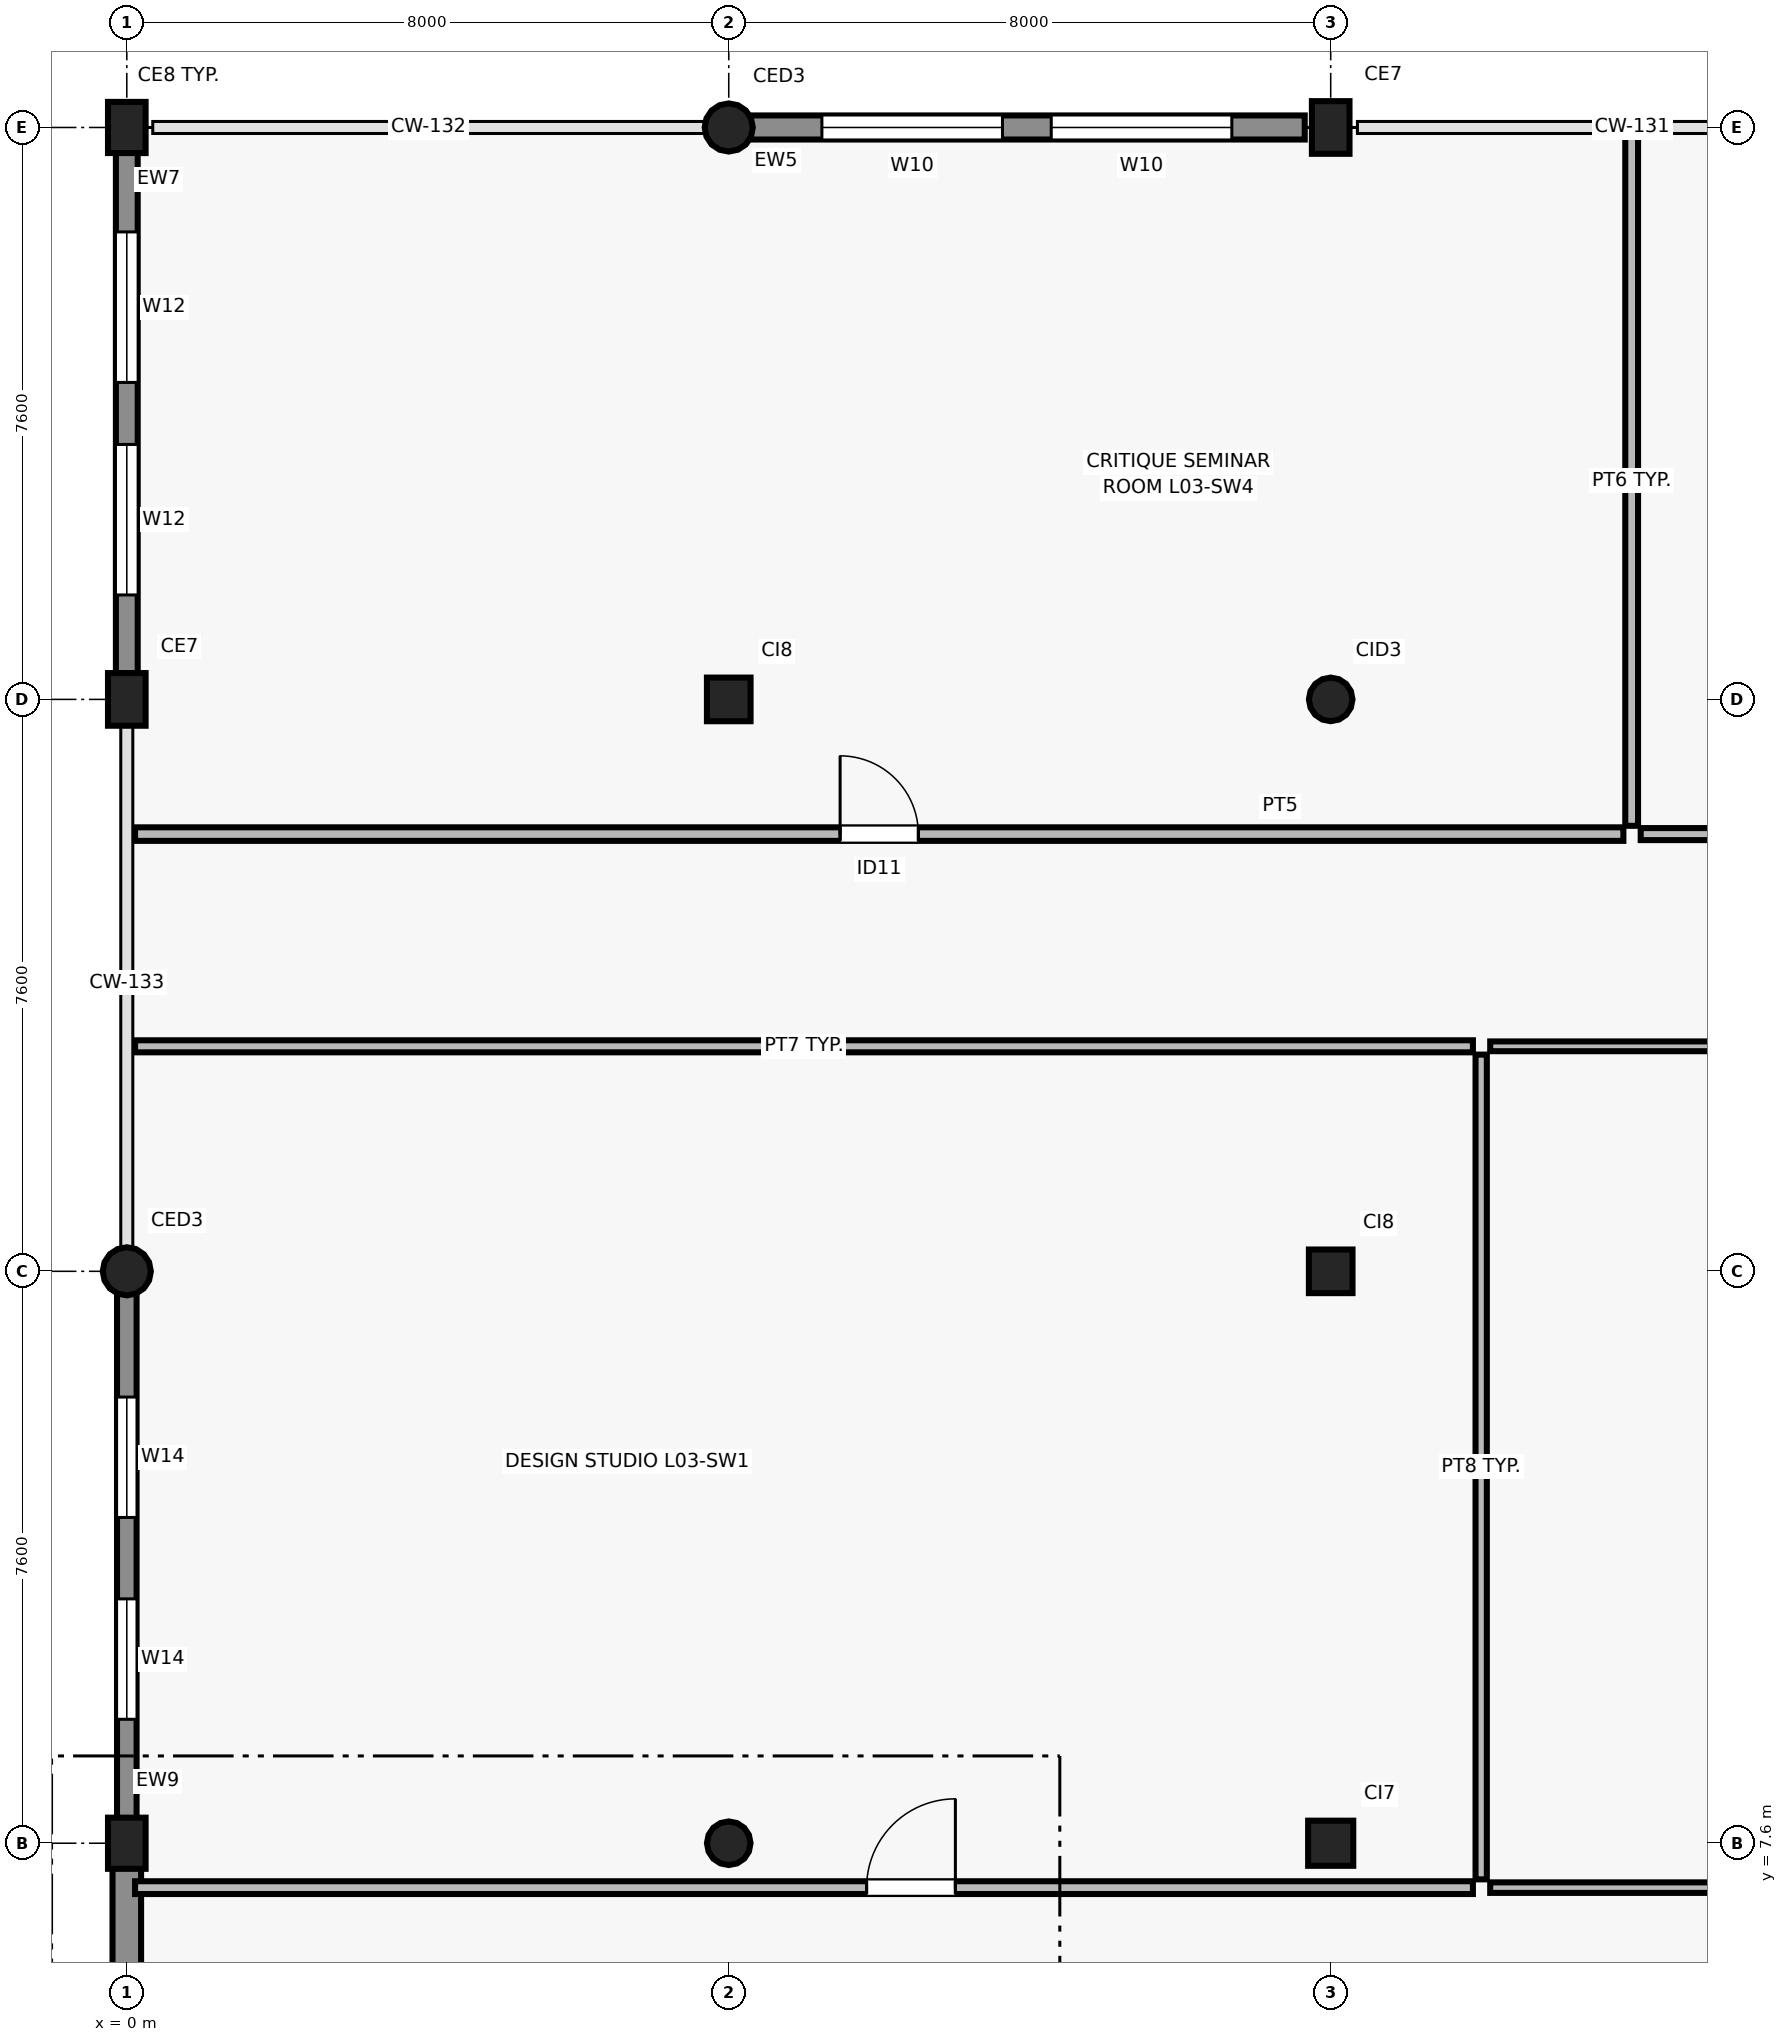
"""IFC4 building model, lengths in metres.
Left out: names, types, materials, properties, quantities, classifications, styles, units other than length and angle.
Written with IfcOpenShell. Run it as: python <this file> out.ifc"""

import sys

from ifc_helpers import new_model, si_unit, direction, frame, frame_2d, origin, origin_2d, place, context, subcontext, project, spatial, rectangle, circle, extrude, element, fill, save


model = new_model("IFC4")
c1 = context("Model", 3, precision=1e-05, world=origin(), true_north=direction((0.0, 1.0)))
c2 = subcontext(c1, "Body", "Model", "MODEL_VIEW")
j1 = project(units=[si_unit("LENGTHUNIT", "METRE"), si_unit("PLANEANGLEUNIT", "RADIAN")], contexts=[c1])
p1 = place(None, origin())
s1 = spatial("IfcSite", under=j1, at=p1, CompositionType="ELEMENT")
p2 = place(p1, origin())
s2 = spatial("IfcBuilding", under=s1, at=p2, CompositionType="ELEMENT")
p3 = place(p2, frame((0.0, 0.0, 13.2)))
s3 = spatial("IfcBuildingStorey", under=s2, at=p3, CompositionType="ELEMENT", Elevation=13.2)
p4 = place(p3, frame((0.0, 7.6, 0.0), z_axis=(0.0, 0.0, 1.0), x_axis=(1.0, 0.0, 0.0)))
e1 = element("IfcColumn", 1, at=p4, inside=s3, PredefinedType="COLUMN", context=c2, shape_type="SweptSolid", body=[
    extrude(rectangle(XDim=0.68, YDim=0.5, at=origin_2d()), origin(), (0.0, 0.0, 1.0), 4.2),
])
p5 = place(p3, frame((0.0, 15.2, 0.0), z_axis=(0.0, 0.0, 1.0), x_axis=(1.0, 0.0, 0.0)))
e2 = element("IfcColumn", 2, at=p5, inside=s3, PredefinedType="COLUMN", context=c2, shape_type="SweptSolid", body=[
    extrude(circle(Radius=0.32, at=origin_2d()), origin(), (0.0, 0.0, 1.0), 4.2),
])
p6 = place(p3, frame((0.0, 22.8, 0.0), z_axis=(0.0, 0.0, 1.0), x_axis=(1.0, 0.0, 0.0)))
e3 = element("IfcColumn", 3, at=p6, inside=s3, PredefinedType="COLUMN", context=c2, shape_type="SweptSolid", body=[
    extrude(rectangle(XDim=0.7, YDim=0.5, at=origin_2d()), origin(), (0.0, 0.0, 1.0), 4.2),
])
p7 = place(p3, frame((0.0, 30.4, 0.0), z_axis=(0.0, 0.0, 1.0), x_axis=(1.0, 0.0, 0.0)))
e4 = element("IfcColumn", 4, at=p7, inside=s3, PredefinedType="COLUMN", context=c2, shape_type="SweptSolid", body=[
    extrude(rectangle(XDim=0.68, YDim=0.5, at=origin_2d()), origin(), (0.0, 0.0, 1.0), 4.2),
])
p8 = place(p3, frame((8.0, 7.6, 0.0), z_axis=(0.0, 0.0, 1.0), x_axis=(1.0, 0.0, 0.0)))
e5 = element("IfcColumn", 5, at=p8, inside=s3, PredefinedType="COLUMN", context=c2, shape_type="SweptSolid", body=[
    extrude(circle(Radius=0.29, at=origin_2d()), origin(), (0.0, 0.0, 1.0), 4.2),
])
p9 = place(p3, frame((8.0, 22.8, 0.0), z_axis=(0.0, 0.0, 1.0), x_axis=(1.0, 0.0, 0.0)))
e6 = element("IfcColumn", 6, at=p9, inside=s3, PredefinedType="COLUMN", context=c2, shape_type="SweptSolid", body=[
    extrude(rectangle(XDim=0.58, YDim=0.58, at=origin_2d()), origin(), (0.0, 0.0, 1.0), 4.2),
])
p10 = place(p3, frame((8.0, 30.4, 0.0), z_axis=(0.0, 0.0, 1.0), x_axis=(1.0, 0.0, 0.0)))
e7 = element("IfcColumn", 7, at=p10, inside=s3, PredefinedType="COLUMN", context=c2, shape_type="SweptSolid", body=[
    extrude(circle(Radius=0.32, at=origin_2d()), origin(), (0.0, 0.0, 1.0), 4.2),
])
p11 = place(p3, frame((16.0, 7.6, 0.0), z_axis=(0.0, 0.0, 1.0), x_axis=(1.0, 0.0, 0.0)))
e8 = element("IfcColumn", 8, at=p11, inside=s3, PredefinedType="COLUMN", context=c2, shape_type="SweptSolid", body=[
    extrude(rectangle(XDim=0.6, YDim=0.6, at=origin_2d()), origin(), (0.0, 0.0, 1.0), 4.2),
])
p12 = place(p3, frame((16.0, 15.2, 0.0), z_axis=(0.0, 0.0, 1.0), x_axis=(1.0, 0.0, 0.0)))
e9 = element("IfcColumn", 9, at=p12, inside=s3, PredefinedType="COLUMN", context=c2, shape_type="SweptSolid", body=[
    extrude(rectangle(XDim=0.58, YDim=0.58, at=origin_2d()), origin(), (0.0, 0.0, 1.0), 4.2),
])
p13 = place(p3, frame((16.0, 22.8, 0.0), z_axis=(0.0, 0.0, 1.0), x_axis=(1.0, 0.0, 0.0)))
e10 = element("IfcColumn", 10, at=p13, inside=s3, PredefinedType="COLUMN", context=c2, shape_type="SweptSolid", body=[
    extrude(circle(Radius=0.29, at=origin_2d()), origin(), (0.0, 0.0, 1.0), 4.2),
])
p14 = place(p3, frame((16.0, 30.4, 0.0), z_axis=(0.0, 0.0, 1.0), x_axis=(1.0, 0.0, 0.0)))
e11 = element("IfcColumn", 11, at=p14, inside=s3, PredefinedType="COLUMN", context=c2, shape_type="SweptSolid", body=[
    extrude(rectangle(XDim=0.7, YDim=0.5, at=origin_2d()), origin(), (0.0, 0.0, 1.0), 4.2),
])
p15 = place(p3, frame((15.655, 30.4, 0.0), z_axis=(0.0, 0.0, 1.0), x_axis=(-1.0, 0.0, 0.0)))
e12 = element("IfcWall", 12, at=p15, inside=s3, PredefinedType="SOLIDWALL", context=c2, shape_type="SweptSolid", body=[
    extrude(rectangle(XDim=7.386, YDim=0.32, at=frame_2d((3.693, 0.0))), origin(), (0.0, 0.0, 1.0), 3.31),
])
p16 = place(p15, frame((0.969, 0.0, 0.9)))
e13 = element("IfcOpeningElement", 13, at=p16, cuts=e12, PredefinedType="OPENING", context=c2, shape_type="SweptSolid", body=[
    extrude(rectangle(XDim=2.4, YDim=1.5, at=frame_2d((1.2, 0.75))), frame((0.0, 0.17, 0.0), z_axis=(0.0, -1.0, 0.0), x_axis=(1.0, 0.0, 0.0)), (0.0, 0.0, 1.0), 0.34),
])
p17 = place(p15, frame((4.017, 0.0, 0.9)))
e14 = element("IfcOpeningElement", 14, at=p17, cuts=e12, PredefinedType="OPENING", context=c2, shape_type="SweptSolid", body=[
    extrude(rectangle(XDim=2.4, YDim=1.5, at=frame_2d((1.2, 0.75))), frame((0.0, 0.17, 0.0), z_axis=(0.0, -1.0, 0.0), x_axis=(1.0, 0.0, 0.0)), (0.0, 0.0, 1.0), 0.34),
])
p18 = place(p3, frame((0.0, 30.155, 0.0), z_axis=(0.0, 0.0, 1.0), x_axis=(0.0, -1.0, 0.0)))
e15 = element("IfcWall", 15, at=p18, inside=s3, PredefinedType="SOLIDWALL", context=c2, shape_type="SweptSolid", body=[
    extrude(rectangle(XDim=7.11, YDim=0.29, at=frame_2d((3.555, 0.0))), origin(), (0.0, 0.0, 1.0), 3.5),
])
p19 = place(p18, frame((1.143, 0.0, 0.9)))
e16 = element("IfcOpeningElement", 16, at=p19, cuts=e15, PredefinedType="OPENING", context=c2, shape_type="SweptSolid", body=[
    extrude(rectangle(XDim=2.0, YDim=1.5, at=frame_2d((1.0, 0.75))), frame((0.0, 0.155, 0.0), z_axis=(0.0, -1.0, 0.0), x_axis=(1.0, 0.0, 0.0)), (0.0, 0.0, 1.0), 0.31),
])
p20 = place(p18, frame((3.967, 0.0, 0.9)))
e17 = element("IfcOpeningElement", 17, at=p20, cuts=e15, PredefinedType="OPENING", context=c2, shape_type="SweptSolid", body=[
    extrude(rectangle(XDim=2.0, YDim=1.5, at=frame_2d((1.0, 0.75))), frame((0.0, 0.155, 0.0), z_axis=(0.0, -1.0, 0.0), x_axis=(1.0, 0.0, 0.0)), (0.0, 0.0, 1.0), 0.31),
])
p21 = place(p3, frame((0.0, 14.931, 0.0), z_axis=(0.0, 0.0, 1.0), x_axis=(0.0, -1.0, 0.0)))
e18 = element("IfcWall", 18, at=p21, inside=s3, PredefinedType="SOLIDWALL", context=c2, shape_type="SweptSolid", body=[
    extrude(rectangle(XDim=7.086, YDim=0.26, at=frame_2d((3.543, 0.0))), origin(), (0.0, 0.0, 1.0), 3.38),
])
p22 = place(p21, frame((1.402, 0.0, 0.9)))
e19 = element("IfcOpeningElement", 19, at=p22, cuts=e18, PredefinedType="OPENING", context=c2, shape_type="SweptSolid", body=[
    extrude(rectangle(XDim=1.6, YDim=1.5, at=frame_2d((0.8, 0.75))), frame((0.0, 0.14, 0.0), z_axis=(0.0, -1.0, 0.0), x_axis=(1.0, 0.0, 0.0)), (0.0, 0.0, 1.0), 0.28),
])
p23 = place(p21, frame((4.084, 0.0, 0.9)))
e20 = element("IfcOpeningElement", 20, at=p23, cuts=e18, PredefinedType="OPENING", context=c2, shape_type="SweptSolid", body=[
    extrude(rectangle(XDim=1.6, YDim=1.5, at=frame_2d((0.8, 0.75))), frame((0.0, 0.14, 0.0), z_axis=(0.0, -1.0, 0.0), x_axis=(1.0, 0.0, 0.0)), (0.0, 0.0, 1.0), 0.28),
])
p24 = place(p3, frame((0.0, 7.355, 0.0), z_axis=(0.0, 0.0, 1.0), x_axis=(0.0, -1.0, 0.0)))
e21 = element("IfcWall", 21, at=p24, inside=s3, PredefinedType="SOLIDWALL", context=c2, shape_type="SweptSolid", body=[
    extrude(rectangle(XDim=7.11, YDim=0.38, at=frame_2d((3.555, 0.0))), origin(), (0.0, 0.0, 1.0), 3.34),
])
p25 = place(p3, frame((0.11, 7.01, 0.0), z_axis=(0.0, 0.0, 1.0), x_axis=(1.0, 0.0, 0.0)))
e22 = element("IfcWall", 22, at=p25, inside=s3, PredefinedType="PARTITIONING", context=c2, shape_type="SweptSolid", body=[
    extrude(rectangle(XDim=17.78, YDim=0.17, at=frame_2d((8.89, 0.0))), origin(), (0.0, 0.0, 1.0), 3.9),
])
p26 = place(p25, frame((9.722, 0.0, 0.0)))
e23 = element("IfcOpeningElement", 23, at=p26, cuts=e22, PredefinedType="OPENING", context=c2, shape_type="SweptSolid", body=[
    extrude(rectangle(XDim=1.18, YDim=2.2, at=frame_2d((0.59, 1.1))), frame((0.0, 0.095, 0.0), z_axis=(0.0, -1.0, 0.0), x_axis=(1.0, 0.0, 0.0)), (0.0, 0.0, 1.0), 0.19),
])
p27 = place(p3, frame((0.11, 18.19, 0.0), z_axis=(0.0, 0.0, 1.0), x_axis=(1.0, 0.0, 0.0)))
e24 = element("IfcWall", 24, at=p27, inside=s3, PredefinedType="PARTITIONING", context=c2, shape_type="SweptSolid", body=[
    extrude(rectangle(XDim=17.78, YDim=0.16, at=frame_2d((8.89, 0.0))), origin(), (0.0, 0.0, 1.0), 3.9),
])
p28 = place(p3, frame((18.0, 7.12, 0.0), z_axis=(0.0, 0.0, 1.0), x_axis=(0.0, 1.0, 0.0)))
e25 = element("IfcWall", 25, at=p28, inside=s3, PredefinedType="PARTITIONING", context=c2, shape_type="SweptSolid", body=[
    extrude(rectangle(XDim=10.96, YDim=0.15, at=frame_2d((5.48, 0.0))), origin(), (0.0, 0.0, 1.0), 3.9),
])
p29 = place(p3, frame((18.12, 7.01, 0.0), z_axis=(0.0, 0.0, 1.0), x_axis=(1.0, 0.0, 0.0)))
e26 = element("IfcWall", 26, at=p29, inside=s3, PredefinedType="PARTITIONING", context=c2, shape_type="SweptSolid", body=[
    extrude(rectangle(XDim=17.16, YDim=0.14, at=frame_2d((8.58, 0.0))), origin(), (0.0, 0.0, 1.0), 3.9),
])
p30 = place(p29, frame((8.02, 0.0, 0.0)))
e27 = element("IfcOpeningElement", 27, at=p30, cuts=e26, PredefinedType="OPENING", context=c2, shape_type="SweptSolid", body=[
    extrude(rectangle(XDim=1.12, YDim=2.2, at=frame_2d((0.56, 1.1))), frame((0.0, 0.08, 0.0), z_axis=(0.0, -1.0, 0.0), x_axis=(1.0, 0.0, 0.0)), (0.0, 0.0, 1.0), 0.16),
])
p31 = place(p3, frame((18.12, 18.19, 0.0), z_axis=(0.0, 0.0, 1.0), x_axis=(1.0, 0.0, 0.0)))
e28 = element("IfcWall", 28, at=p31, inside=s3, PredefinedType="PARTITIONING", context=c2, shape_type="SweptSolid", body=[
    extrude(rectangle(XDim=17.16, YDim=0.13, at=frame_2d((8.58, 0.0))), origin(), (0.0, 0.0, 1.0), 3.9),
])
p32 = place(p3, frame((0.11, 21.01, 0.0), z_axis=(0.0, 0.0, 1.0), x_axis=(1.0, 0.0, 0.0)))
e29 = element("IfcWall", 29, at=p32, inside=s3, PredefinedType="PARTITIONING", context=c2, shape_type="SweptSolid", body=[
    extrude(rectangle(XDim=19.78, YDim=0.18, at=frame_2d((9.89, 0.0))), origin(), (0.0, 0.0, 1.0), 3.9),
])
p33 = place(p32, frame((9.37, 0.0, 0.0)))
e30 = element("IfcOpeningElement", 30, at=p33, cuts=e29, PredefinedType="OPENING", context=c2, shape_type="SweptSolid", body=[
    extrude(rectangle(XDim=1.04, YDim=2.15, at=frame_2d((0.52, 1.075))), frame((0.0, 0.1, 0.0), z_axis=(0.0, -1.0, 0.0), x_axis=(1.0, 0.0, 0.0)), (0.0, 0.0, 1.0), 0.2),
])
p34 = place(p3, frame((20.0, 21.12, 0.0), z_axis=(0.0, 0.0, 1.0), x_axis=(0.0, 1.0, 0.0)))
e31 = element("IfcWall", 31, at=p34, inside=s3, PredefinedType="PARTITIONING", context=c2, shape_type="SweptSolid", body=[
    extrude(rectangle(XDim=9.17, YDim=0.17, at=frame_2d((4.585, 0.0))), origin(), (0.0, 0.0, 1.0), 3.9),
])
p35 = place(p3, frame((20.12, 21.01, 0.0), z_axis=(0.0, 0.0, 1.0), x_axis=(1.0, 0.0, 0.0)))
e32 = element("IfcWall", 32, at=p35, inside=s3, PredefinedType="PARTITIONING", context=c2, shape_type="SweptSolid", body=[
    extrude(rectangle(XDim=15.16, YDim=0.16, at=frame_2d((7.58, 0.0))), origin(), (0.0, 0.0, 1.0), 3.9),
])
p36 = place(p35, frame((7.08, 0.0, 0.0)))
e33 = element("IfcOpeningElement", 33, at=p36, cuts=e32, PredefinedType="OPENING", context=c2, shape_type="SweptSolid", body=[
    extrude(rectangle(XDim=1.0, YDim=2.15, at=frame_2d((0.5, 1.075))), frame((0.0, 0.09, 0.0), z_axis=(0.0, -1.0, 0.0), x_axis=(1.0, 0.0, 0.0)), (0.0, 0.0, 1.0), 0.18),
])
p37 = place(p16, origin())
e34 = element("IfcWindow", 34, at=p37, inside=s3, PartitioningType="SINGLE_PANEL", PredefinedType="WINDOW", context=c2, shape_type="SweptSolid", body=[
    extrude(rectangle(XDim=2.4, YDim=1.5, at=frame_2d((1.2, 0.75))), frame((0.0, 0.03, 0.0), z_axis=(0.0, -1.0, 0.0), x_axis=(1.0, 0.0, 0.0)), (0.0, 0.0, 1.0), 0.06),
])
fill(e13, e34)
p38 = place(p17, origin())
e35 = element("IfcWindow", 35, at=p38, inside=s3, PartitioningType="SINGLE_PANEL", PredefinedType="WINDOW", context=c2, shape_type="SweptSolid", body=[
    extrude(rectangle(XDim=2.4, YDim=1.5, at=frame_2d((1.2, 0.75))), frame((0.0, 0.03, 0.0), z_axis=(0.0, -1.0, 0.0), x_axis=(1.0, 0.0, 0.0)), (0.0, 0.0, 1.0), 0.06),
])
fill(e14, e35)
p39 = place(p19, origin())
e36 = element("IfcWindow", 36, at=p39, inside=s3, PartitioningType="SINGLE_PANEL", PredefinedType="WINDOW", context=c2, shape_type="SweptSolid", body=[
    extrude(rectangle(XDim=2.0, YDim=1.5, at=frame_2d((1.0, 0.75))), frame((0.0, 0.03, 0.0), z_axis=(0.0, -1.0, 0.0), x_axis=(1.0, 0.0, 0.0)), (0.0, 0.0, 1.0), 0.06),
])
fill(e16, e36)
p40 = place(p20, origin())
e37 = element("IfcWindow", 37, at=p40, inside=s3, PartitioningType="SINGLE_PANEL", PredefinedType="WINDOW", context=c2, shape_type="SweptSolid", body=[
    extrude(rectangle(XDim=2.0, YDim=1.5, at=frame_2d((1.0, 0.75))), frame((0.0, 0.03, 0.0), z_axis=(0.0, -1.0, 0.0), x_axis=(1.0, 0.0, 0.0)), (0.0, 0.0, 1.0), 0.06),
])
fill(e17, e37)
p41 = place(p22, origin())
e38 = element("IfcWindow", 38, at=p41, inside=s3, PartitioningType="SINGLE_PANEL", PredefinedType="WINDOW", context=c2, shape_type="SweptSolid", body=[
    extrude(rectangle(XDim=1.6, YDim=1.5, at=frame_2d((0.8, 0.75))), frame((0.0, 0.03, 0.0), z_axis=(0.0, -1.0, 0.0), x_axis=(1.0, 0.0, 0.0)), (0.0, 0.0, 1.0), 0.06),
])
fill(e19, e38)
p42 = place(p23, origin())
e39 = element("IfcWindow", 39, at=p42, inside=s3, PartitioningType="SINGLE_PANEL", PredefinedType="WINDOW", context=c2, shape_type="SweptSolid", body=[
    extrude(rectangle(XDim=1.6, YDim=1.5, at=frame_2d((0.8, 0.75))), frame((0.0, 0.03, 0.0), z_axis=(0.0, -1.0, 0.0), x_axis=(1.0, 0.0, 0.0)), (0.0, 0.0, 1.0), 0.06),
])
fill(e20, e39)
p43 = place(p26, origin())
e40 = element("IfcDoor", 40, at=p43, inside=s3, OperationType="SINGLE_SWING_RIGHT", PredefinedType="DOOR", context=c2, shape_type="SweptSolid", body=[
    extrude(rectangle(XDim=1.18, YDim=2.2, at=frame_2d((0.59, 1.1))), frame((0.0, 0.025, 0.0), z_axis=(0.0, -1.0, 0.0), x_axis=(1.0, 0.0, 0.0)), (0.0, 0.0, 1.0), 0.05),
])
fill(e23, e40)
p44 = place(p33, origin())
e41 = element("IfcDoor", 41, at=p44, inside=s3, OperationType="SINGLE_SWING_LEFT", PredefinedType="DOOR", context=c2, shape_type="SweptSolid", body=[
    extrude(rectangle(XDim=1.04, YDim=2.15, at=frame_2d((0.52, 1.075))), frame((0.0, 0.025, 0.0), z_axis=(0.0, -1.0, 0.0), x_axis=(1.0, 0.0, 0.0)), (0.0, 0.0, 1.0), 0.05),
])
fill(e30, e41)
save(model, sys.argv[1])
